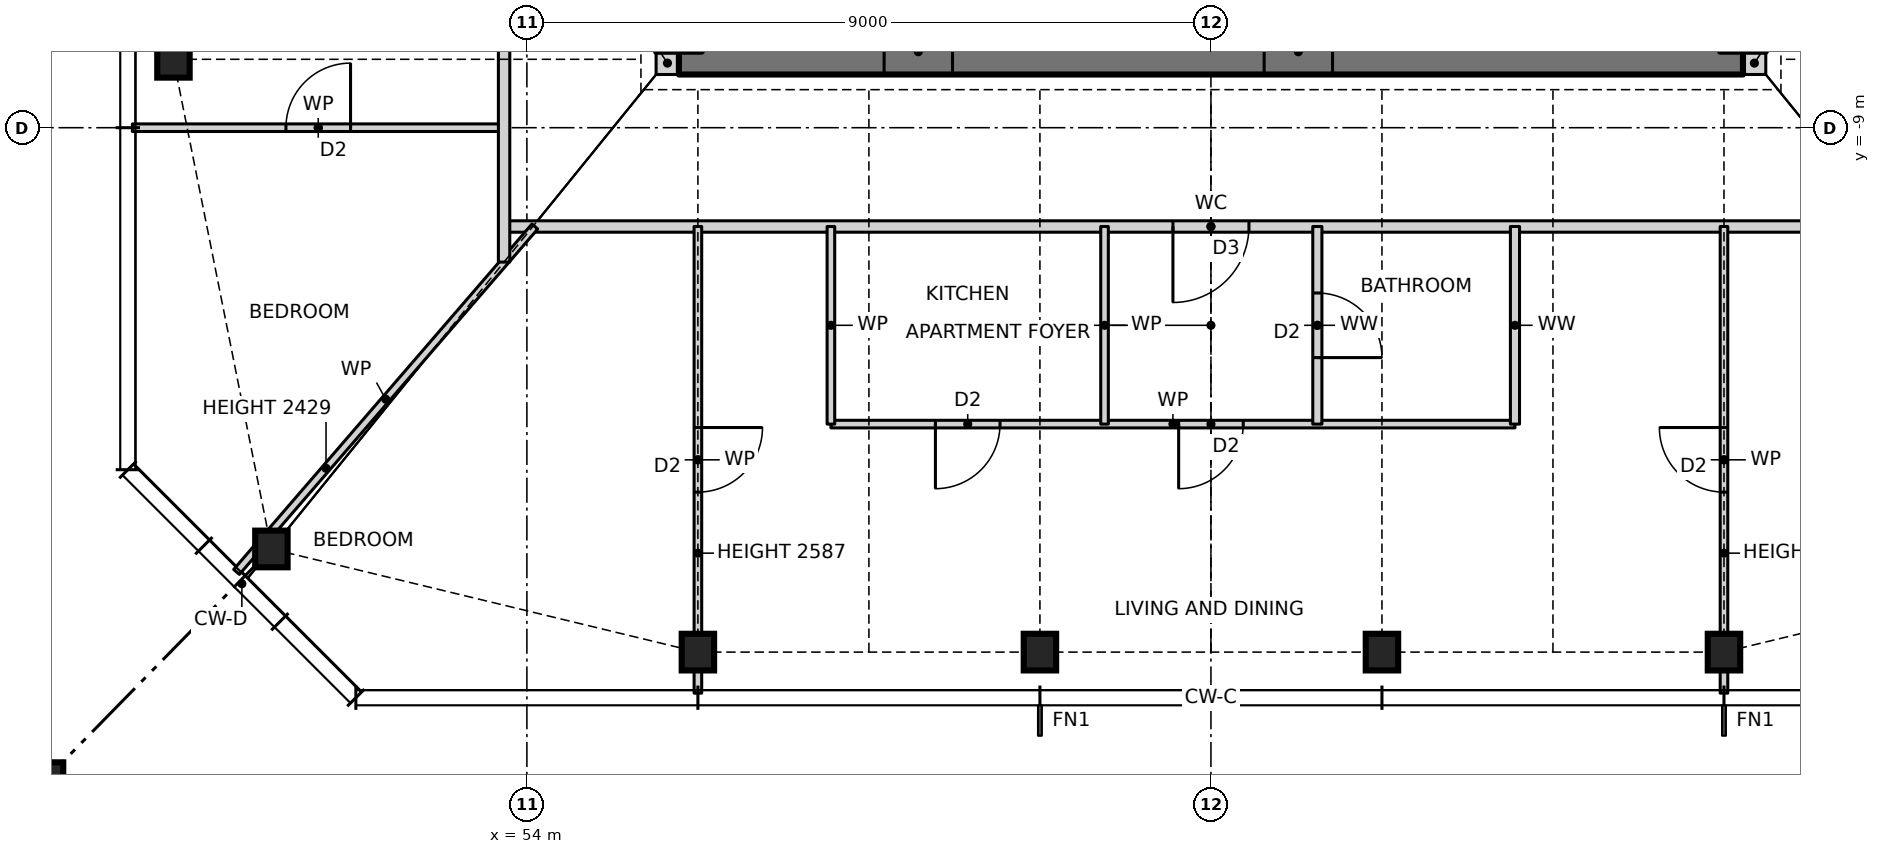
"""IFC4 building model, lengths in metres.
Left out: names, types, materials, properties, quantities, classifications, styles, units other than length and angle.
Written with IfcOpenShell. Run it as: python <this file> out.ifc"""

import sys

from ifc_helpers import new_model, si_unit, direction, frame, frame_2d, origin, origin_2d, place, context, subcontext, project, spatial, rectangle, hollow_rectangle, i_section, extrude, element, fill, save


model = new_model("IFC4")
c1 = context("Model", 3, precision=1e-05, world=origin(), true_north=direction((0.0, 1.0)))
c2 = subcontext(c1, "Body", "Model", "MODEL_VIEW")
j1 = project(units=[si_unit("LENGTHUNIT", "METRE"), si_unit("PLANEANGLEUNIT", "RADIAN")], contexts=[c1])
p1 = place(None, origin())
s1 = spatial("IfcSite", under=j1, at=p1, CompositionType="ELEMENT")
p2 = place(p1, origin())
s2 = spatial("IfcBuilding", under=s1, at=p2, CompositionType="ELEMENT")
p3 = place(p2, frame((0.0, 0.0, 108.5)))
s3 = spatial("IfcBuildingStorey", under=s2, at=p3, CompositionType="ELEMENT", Elevation=108.5)
for number, where, z_axis, x_axis in (
    (1, (50.639, -14.543, 0.0), (0.0, 0.0, 1.0), (1.0, 0.0, 0.0)),
    (2, (56.25, -15.9, 0.0), (0.0, 0.0, 1.0), (1.0, 0.0, 0.0)),
    (3, (60.75, -15.9, 0.0), (0.0, 0.0, 1.0), (1.0, 0.0, 0.0)),
    (4, (65.25, -15.9, 0.0), (0.0, 0.0, 1.0), (1.0, 0.0, 0.0)),
    (5, (69.75, -15.9, 0.0), (0.0, 0.0, 1.0), (1.0, 0.0, 0.0)),
    (6, (49.35, -8.1, 0.0), (0.0, 0.0, 1.0), (1.0, 0.0, 0.0)),
):
    element("IfcColumn", number, at=place(p3, frame(where, z_axis=z_axis, x_axis=x_axis)), inside=s3, PredefinedType="COLUMN", context=c2, shape_type="SweptSolid", body=[
        extrude(i_section(OverallWidth=0.427, OverallDepth=0.483, WebThickness=0.051, FlangeThickness=0.082, at=origin_2d()), origin(), (0.0, 0.0, 1.0), 3.5),
    ])
p4 = place(p3, frame((47.35, -17.9, 0.0), z_axis=(0.0, 0.0, 1.0), x_axis=(1.0, 0.0, 0.0)))
e7 = element("IfcColumn", 7, at=p4, inside=s3, PredefinedType="COLUMN", context=c2, shape_type="SweptSolid", body=[
    extrude(hollow_rectangle(XDim=1.1, YDim=1.1, WallThickness=0.06, at=origin_2d()), origin(), (0.0, 0.0, 1.0), 3.5),
])
for number, where, z_axis, x_axis in (
    (8, (55.7, -8.15, 0.0), (0.0, 0.0, 1.0), (1.0, 0.0, 0.0)),
    (9, (70.0, -8.15, 0.0), (0.0, 0.0, 1.0), (1.0, 0.0, 0.0)),
):
    element("IfcWall", number, at=place(p3, frame(where, z_axis=z_axis, x_axis=x_axis)), inside=s3, PredefinedType="SOLIDWALL", context=c2, shape_type="SweptSolid", body=[
        extrude(rectangle(XDim=0.3, YDim=0.3, at=frame_2d((0.15, 0.0))), origin(), (0.0, 0.0, 1.0), 3.5),
    ])
p5 = place(p3, frame((56.0, -8.0, 0.0), z_axis=(0.0, 0.0, 1.0), x_axis=(1.0, 0.0, 0.0)))
e10 = element("IfcWall", 10, at=p5, inside=s3, PredefinedType="SHEAR", context=c2, shape_type="SweptSolid", body=[
    extrude(rectangle(XDim=14.0, YDim=0.6, at=frame_2d((7.0, 0.0))), origin(), (0.0, 0.0, 1.0), 3.5),
])
p6 = place(p5, frame((2.7, 0.0, 0.0)))
e11 = element("IfcOpeningElement", 11, at=p6, cuts=e10, PredefinedType="OPENING", context=c2, shape_type="SweptSolid", body=[
    extrude(rectangle(XDim=0.9, YDim=2.1, at=frame_2d((0.45, 1.05))), frame((0.0, 0.31, 0.0), z_axis=(0.0, -1.0, 0.0), x_axis=(1.0, 0.0, 0.0)), (0.0, 0.0, 1.0), 0.62),
])
p7 = place(p5, frame((7.7, 0.0, 0.0)))
e12 = element("IfcOpeningElement", 12, at=p7, cuts=e10, PredefinedType="OPENING", context=c2, shape_type="SweptSolid", body=[
    extrude(rectangle(XDim=0.9, YDim=2.1, at=frame_2d((0.45, 1.05))), frame((0.0, 0.31, 0.0), z_axis=(0.0, -1.0, 0.0), x_axis=(1.0, 0.0, 0.0)), (0.0, 0.0, 1.0), 0.62),
])
p8 = place(p3, frame((58.0, -12.9, 0.0), z_axis=(0.0, 0.0, 1.0), x_axis=(1.0, 0.0, 0.0)))
e13 = element("IfcWall", 13, at=p8, inside=s3, PredefinedType="PARTITIONING", context=c2, shape_type="SweptSolid", body=[
    extrude(rectangle(XDim=9.0, YDim=0.1, at=frame_2d((4.5, 0.0))), origin(), (0.0, 0.0, 1.0), 3.27),
])
p9 = place(p8, frame((1.375, 0.0, 0.0)))
e14 = element("IfcOpeningElement", 14, at=p9, cuts=e13, PredefinedType="OPENING", context=c2, shape_type="SweptSolid", body=[
    extrude(rectangle(XDim=0.85, YDim=2.1, at=frame_2d((0.425, 1.05))), frame((0.0, 0.06, 0.0), z_axis=(0.0, -1.0, 0.0), x_axis=(1.0, 0.0, 0.0)), (0.0, 0.0, 1.0), 0.12),
])
p10 = place(p8, frame((4.575, 0.0, 0.0)))
e15 = element("IfcOpeningElement", 15, at=p10, cuts=e13, PredefinedType="OPENING", context=c2, shape_type="SweptSolid", body=[
    extrude(rectangle(XDim=0.85, YDim=2.1, at=frame_2d((0.425, 1.05))), frame((0.0, 0.06, 0.0), z_axis=(0.0, -1.0, 0.0), x_axis=(1.0, 0.0, 0.0)), (0.0, 0.0, 1.0), 0.12),
])
p11 = place(p3, frame((53.7, -10.3, 0.0), z_axis=(0.0, 0.0, 1.0), x_axis=(1.0, 0.0, 0.0)))
e16 = element("IfcWall", 16, at=p11, inside=s3, PredefinedType="PARTITIONING", context=c2, shape_type="SweptSolid", body=[
    extrude(rectangle(XDim=18.6, YDim=0.15, at=frame_2d((9.3, 0.0))), origin(), (0.0, 0.0, 1.0), 3.27),
])
p12 = place(p11, frame((8.8, 0.0, 0.0)))
e17 = element("IfcOpeningElement", 17, at=p12, cuts=e16, PredefinedType="OPENING", context=c2, shape_type="SweptSolid", body=[
    extrude(rectangle(XDim=1.0, YDim=2.1, at=frame_2d((0.5, 1.05))), frame((0.0, 0.085, 0.0), z_axis=(0.0, -1.0, 0.0), x_axis=(1.0, 0.0, 0.0)), (0.0, 0.0, 1.0), 0.17),
])
p13 = place(p3, frame((48.81, -9.0, 0.0), z_axis=(0.0, 0.0, 1.0), x_axis=(1.0, 0.0, 0.0)))
e18 = element("IfcWall", 18, at=p13, inside=s3, PredefinedType="PARTITIONING", context=c2, shape_type="SweptSolid", body=[
    extrude(rectangle(XDim=4.89, YDim=0.1, at=frame_2d((2.445, 0.0))), origin(), (0.0, 0.0, 1.0), 3.27),
])
p14 = place(p13, frame((2.02, 0.0, 0.0)))
e19 = element("IfcOpeningElement", 19, at=p14, cuts=e18, PredefinedType="OPENING", context=c2, shape_type="SweptSolid", body=[
    extrude(rectangle(XDim=0.85, YDim=2.1, at=frame_2d((0.425, 1.05))), frame((0.0, 0.06, 0.0), z_axis=(0.0, -1.0, 0.0), x_axis=(1.0, 0.0, 0.0)), (0.0, 0.0, 1.0), 0.12),
])
p15 = place(p3, frame((50.18, -14.845, 0.0), z_axis=(0.0, 0.0, 1.0), x_axis=(0.653585997703, 0.756852260092, 0.0)))
e20 = element("IfcWall", 20, at=p15, inside=s3, PredefinedType="PARTITIONING", context=c2, shape_type="SweptSolid", body=[
    extrude(rectangle(XDim=6.005, YDim=0.1, at=frame_2d((3.002, 0.0))), origin(), (0.0, 0.0, 1.0), 2.429),
])
p16 = place(p3, frame((69.75, -16.44, 0.0), z_axis=(0.0, 0.0, 1.0), x_axis=(0.0, 1.0, 0.0)))
e21 = element("IfcWall", 21, at=p16, inside=s3, PredefinedType="PARTITIONING", context=c2, shape_type="SweptSolid", body=[
    extrude(rectangle(XDim=6.14, YDim=0.1, at=frame_2d((3.07, 0.0))), origin(), (0.0, 0.0, 1.0), 2.587),
])
p17 = place(p16, frame((2.645, 0.0, 0.0)))
e22 = element("IfcOpeningElement", 22, at=p17, cuts=e21, PredefinedType="OPENING", context=c2, shape_type="SweptSolid", body=[
    extrude(rectangle(XDim=0.85, YDim=2.1, at=frame_2d((0.425, 1.05))), frame((0.0, 0.06, 0.0), z_axis=(0.0, -1.0, 0.0), x_axis=(1.0, 0.0, 0.0)), (0.0, 0.0, 1.0), 0.12),
])
p18 = place(p3, frame((67.0, -12.9, 0.0), z_axis=(0.0, 0.0, 1.0), x_axis=(0.0, 1.0, 0.0)))
e23 = element("IfcWall", 23, at=p18, inside=s3, PredefinedType="PARTITIONING", context=c2, shape_type="SweptSolid", body=[
    extrude(rectangle(XDim=2.6, YDim=0.12, at=frame_2d((1.3, 0.0))), origin(), (0.0, 0.0, 1.0), 3.27),
])
p19 = place(p3, frame((64.4, -12.9, 0.0), z_axis=(0.0, 0.0, 1.0), x_axis=(0.0, 1.0, 0.0)))
e24 = element("IfcWall", 24, at=p19, inside=s3, PredefinedType="PARTITIONING", context=c2, shape_type="SweptSolid", body=[
    extrude(rectangle(XDim=2.6, YDim=0.12, at=frame_2d((1.3, 0.0))), origin(), (0.0, 0.0, 1.0), 3.27),
])
p20 = place(p19, frame((0.875, 0.0, 0.0)))
e25 = element("IfcOpeningElement", 25, at=p20, cuts=e24, PredefinedType="OPENING", context=c2, shape_type="SweptSolid", body=[
    extrude(rectangle(XDim=0.85, YDim=2.1, at=frame_2d((0.425, 1.05))), frame((0.0, 0.07, 0.0), z_axis=(0.0, -1.0, 0.0), x_axis=(1.0, 0.0, 0.0)), (0.0, 0.0, 1.0), 0.14),
])
for number, where, z_axis, x_axis in (
    (26, (61.6, -12.9, 0.0), (0.0, 0.0, 1.0), (0.0, 1.0, 0.0)),
    (27, (58.0, -12.9, 0.0), (0.0, 0.0, 1.0), (0.0, 1.0, 0.0)),
):
    element("IfcWall", number, at=place(p3, frame(where, z_axis=z_axis, x_axis=x_axis)), inside=s3, PredefinedType="PARTITIONING", context=c2, shape_type="SweptSolid", body=[
        extrude(rectangle(XDim=2.6, YDim=0.1, at=frame_2d((1.3, 0.0))), origin(), (0.0, 0.0, 1.0), 3.27),
    ])
p21 = place(p3, frame((56.25, -16.44, 0.0), z_axis=(0.0, 0.0, 1.0), x_axis=(0.0, 1.0, 0.0)))
e28 = element("IfcWall", 28, at=p21, inside=s3, PredefinedType="PARTITIONING", context=c2, shape_type="SweptSolid", body=[
    extrude(rectangle(XDim=6.14, YDim=0.1, at=frame_2d((3.07, 0.0))), origin(), (0.0, 0.0, 1.0), 2.587),
])
p22 = place(p21, frame((2.645, 0.0, 0.0)))
e29 = element("IfcOpeningElement", 29, at=p22, cuts=e28, PredefinedType="OPENING", context=c2, shape_type="SweptSolid", body=[
    extrude(rectangle(XDim=0.85, YDim=2.1, at=frame_2d((0.425, 1.05))), frame((0.0, 0.06, 0.0), z_axis=(0.0, -1.0, 0.0), x_axis=(1.0, 0.0, 0.0)), (0.0, 0.0, 1.0), 0.12),
])
p23 = place(p3, frame((53.7, -10.768, 0.0), z_axis=(0.0, 0.0, 1.0), x_axis=(0.0, 1.0, 0.0)))
e30 = element("IfcWall", 30, at=p23, inside=s3, PredefinedType="PARTITIONING", context=c2, shape_type="SweptSolid", body=[
    extrude(rectangle(XDim=21.668, YDim=0.15, at=frame_2d((10.834, 0.0))), origin(), (0.0, 0.0, 1.0), 3.27),
])
p24 = place(p23, frame((10.268, 0.0, 0.0)))
e31 = element("IfcOpeningElement", 31, at=p24, cuts=e30, PredefinedType="OPENING", context=c2, shape_type="SweptSolid", body=[
    extrude(rectangle(XDim=1.0, YDim=2.1, at=frame_2d((0.5, 1.05))), frame((0.0, 0.085, 0.0), z_axis=(0.0, -1.0, 0.0), x_axis=(1.0, 0.0, 0.0)), (0.0, 0.0, 1.0), 0.17),
])
p25 = place(p9, frame((0.85, 0.0, 0.0), z_axis=(0.0, 0.0, 1.0), x_axis=(-1.0, 0.0, 0.0)))
e32 = element("IfcDoor", 32, at=p25, inside=s3, OperationType="SINGLE_SWING_RIGHT", PredefinedType="DOOR", context=c2, shape_type="SweptSolid", body=[
    extrude(rectangle(XDim=0.85, YDim=2.1, at=frame_2d((0.425, 1.05))), frame((0.0, 0.025, 0.0), z_axis=(0.0, -1.0, 0.0), x_axis=(1.0, 0.0, 0.0)), (0.0, 0.0, 1.0), 0.05),
])
fill(e14, e32)
p26 = place(p12, frame((1.0, 0.0, 0.0), z_axis=(0.0, 0.0, 1.0), x_axis=(-1.0, 0.0, 0.0)))
e33 = element("IfcDoor", 33, at=p26, inside=s3, OperationType="SINGLE_SWING_RIGHT", PredefinedType="DOOR", context=c2, shape_type="SweptSolid", body=[
    extrude(rectangle(XDim=1.0, YDim=2.1, at=frame_2d((0.5, 1.05))), frame((0.0, 0.025, 0.0), z_axis=(0.0, -1.0, 0.0), x_axis=(1.0, 0.0, 0.0)), (0.0, 0.0, 1.0), 0.05),
])
fill(e17, e33)
p27 = place(p10, frame((0.85, 0.0, 0.0), z_axis=(0.0, 0.0, 1.0), x_axis=(-1.0, 0.0, 0.0)))
e34 = element("IfcDoor", 34, at=p27, inside=s3, OperationType="SINGLE_SWING_RIGHT", PredefinedType="DOOR", context=c2, shape_type="SweptSolid", body=[
    extrude(rectangle(XDim=0.85, YDim=2.1, at=frame_2d((0.425, 1.05))), frame((0.0, 0.025, 0.0), z_axis=(0.0, -1.0, 0.0), x_axis=(1.0, 0.0, 0.0)), (0.0, 0.0, 1.0), 0.05),
])
fill(e15, e34)
p28 = place(p20, frame((0.85, 0.0, 0.0), z_axis=(0.0, 0.0, 1.0), x_axis=(-1.0, 0.0, 0.0)))
e35 = element("IfcDoor", 35, at=p28, inside=s3, OperationType="SINGLE_SWING_RIGHT", PredefinedType="DOOR", context=c2, shape_type="SweptSolid", body=[
    extrude(rectangle(XDim=0.85, YDim=2.1, at=frame_2d((0.425, 1.05))), frame((0.0, 0.025, 0.0), z_axis=(0.0, -1.0, 0.0), x_axis=(1.0, 0.0, 0.0)), (0.0, 0.0, 1.0), 0.05),
])
fill(e25, e35)
p29 = place(p22, frame((0.85, 0.0, 0.0), z_axis=(0.0, 0.0, 1.0), x_axis=(-1.0, 0.0, 0.0)))
e36 = element("IfcDoor", 36, at=p29, inside=s3, OperationType="SINGLE_SWING_LEFT", PredefinedType="DOOR", context=c2, shape_type="SweptSolid", body=[
    extrude(rectangle(XDim=0.85, YDim=2.1, at=frame_2d((0.425, 1.05))), frame((0.0, 0.025, 0.0), z_axis=(0.0, -1.0, 0.0), x_axis=(1.0, 0.0, 0.0)), (0.0, 0.0, 1.0), 0.05),
])
fill(e29, e36)
p30 = place(p17, origin())
e37 = element("IfcDoor", 37, at=p30, inside=s3, OperationType="SINGLE_SWING_RIGHT", PredefinedType="DOOR", context=c2, shape_type="SweptSolid", body=[
    extrude(rectangle(XDim=0.85, YDim=2.1, at=frame_2d((0.425, 1.05))), frame((0.0, 0.025, 0.0), z_axis=(0.0, -1.0, 0.0), x_axis=(1.0, 0.0, 0.0)), (0.0, 0.0, 1.0), 0.05),
])
fill(e22, e37)
p31 = place(p14, origin())
e38 = element("IfcDoor", 38, at=p31, inside=s3, OperationType="SINGLE_SWING_RIGHT", PredefinedType="DOOR", context=c2, shape_type="SweptSolid", body=[
    extrude(rectangle(XDim=0.85, YDim=2.1, at=frame_2d((0.425, 1.05))), frame((0.0, 0.025, 0.0), z_axis=(0.0, -1.0, 0.0), x_axis=(1.0, 0.0, 0.0)), (0.0, 0.0, 1.0), 0.05),
])
fill(e19, e38)
p32 = place(p6, origin())
e39 = element("IfcDoor", 39, at=p32, inside=s3, OperationType="SINGLE_SWING_LEFT", PredefinedType="DOOR", context=c2, shape_type="SweptSolid", body=[
    extrude(rectangle(XDim=0.9, YDim=2.1, at=frame_2d((0.45, 1.05))), frame((0.0, 0.025, 0.0), z_axis=(0.0, -1.0, 0.0), x_axis=(1.0, 0.0, 0.0)), (0.0, 0.0, 1.0), 0.05),
])
fill(e11, e39)
p33 = place(p7, origin())
e40 = element("IfcDoor", 40, at=p33, inside=s3, OperationType="SINGLE_SWING_LEFT", PredefinedType="DOOR", context=c2, shape_type="SweptSolid", body=[
    extrude(rectangle(XDim=0.9, YDim=2.1, at=frame_2d((0.45, 1.05))), frame((0.0, 0.025, 0.0), z_axis=(0.0, -1.0, 0.0), x_axis=(1.0, 0.0, 0.0)), (0.0, 0.0, 1.0), 0.05),
])
fill(e12, e40)
save(model, sys.argv[1])
